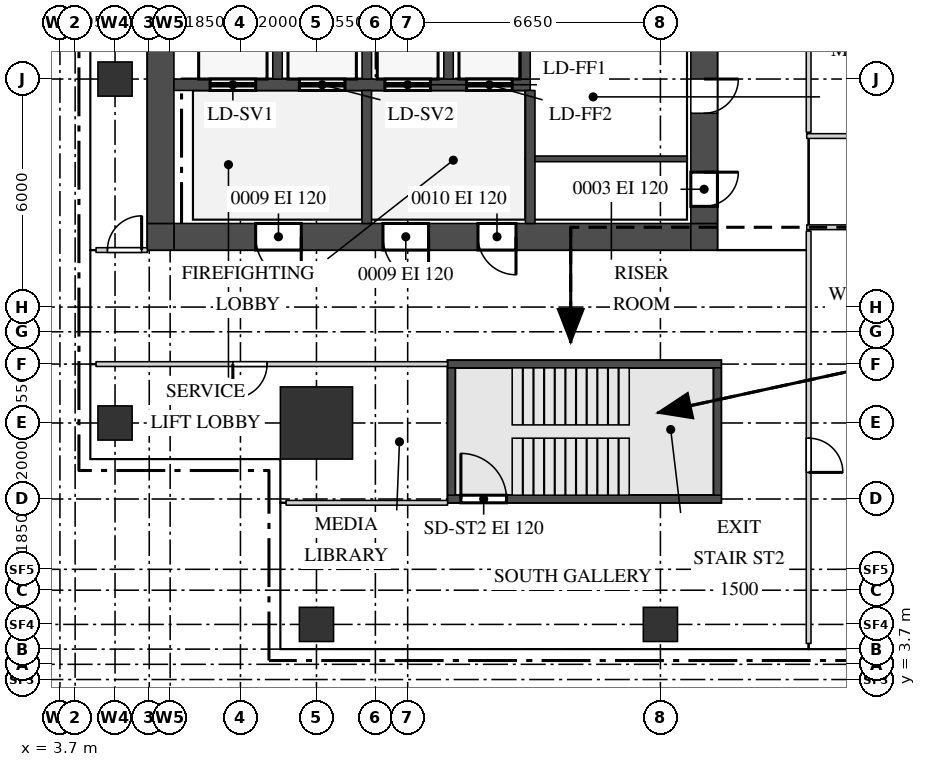
"""IFC4 building model, lengths in metres.
Left out: names, types, materials, properties, quantities, classifications, styles, units other than length and angle.
Written with IfcOpenShell. Run it as: python <this file> out.ifc"""

import sys

from ifc_helpers import new_model, si_unit, direction, frame, frame_2d, origin, origin_2d, place, context, subcontext, project, spatial, rectangle, extrude, source, transform, mapped, element, fill, save


model = new_model("IFC4")
c1 = context("Model", 3, precision=1e-05, world=origin(), true_north=direction((0.0, 1.0)))
c2 = subcontext(c1, "Body", "Model", "MODEL_VIEW")
j1 = project(units=[si_unit("LENGTHUNIT", "METRE"), si_unit("PLANEANGLEUNIT", "RADIAN")], contexts=[c1])
p1 = place(None, origin())
s1 = spatial("IfcSite", under=j1, at=p1, CompositionType="ELEMENT")
p2 = place(p1, origin())
s2 = spatial("IfcBuilding", under=s1, at=p2, CompositionType="ELEMENT")
p3 = place(p2, frame((0.0, 0.0, 246.2)))
s3 = spatial("IfcBuildingStorey", under=s2, at=p3, CompositionType="ELEMENT", Elevation=246.2)
m1 = source(origin(), c2, "Body", "SweptSolid", [
    extrude(rectangle(XDim=13.6, YDim=0.7, at=frame_2d((6.8, 0.0))), origin(), (0.0, 0.0, 1.0), 3.75),
])
p4 = place(p3, frame((6.7, 15.35, 0.0), z_axis=(0.0, 0.0, 1.0), x_axis=(1.0, 0.0, 0.0)))
e1 = element("IfcWall", 1, at=p4, inside=s3, PredefinedType="SHEAR", context=c2, shape_type="MappedRepresentation", body=[
    mapped(m1, transform((0.0, 0.0, 0.0))),
])
m2 = source(origin(), c2, "Body", "SweptSolid", [
    extrude(rectangle(XDim=1.2, YDim=2.1, at=frame_2d((0.6, 1.05))), frame((0.0, 0.36, 0.0), z_axis=(0.0, -1.0, 0.0), x_axis=(1.0, 0.0, 0.0)), (0.0, 0.0, 1.0), 0.72),
])
p5 = place(p4, frame((5.5, 0.0, 0.0)))
e2 = element("IfcOpeningElement", 2, at=p5, cuts=e1, PredefinedType="OPENING", context=c2, shape_type="MappedRepresentation", body=[
    mapped(m2, transform((0.0, 0.0, 0.0))),
])
p6 = place(p4, frame((2.15, 0.0, 0.0)))
e3 = element("IfcOpeningElement", 3, at=p6, cuts=e1, PredefinedType="OPENING", context=c2, shape_type="MappedRepresentation", body=[
    mapped(m2, transform((0.0, 0.0, 0.0))),
])
m3 = source(origin(), c2, "Body", "SweptSolid", [
    extrude(rectangle(XDim=1.0, YDim=2.1, at=frame_2d((0.5, 1.05))), frame((0.0, 0.36, 0.0), z_axis=(0.0, -1.0, 0.0), x_axis=(1.0, 0.0, 0.0)), (0.0, 0.0, 1.0), 0.72),
])
p7 = place(p4, frame((8.0, 0.0, 0.0)))
e4 = element("IfcOpeningElement", 4, at=p7, cuts=e1, PredefinedType="OPENING", context=c2, shape_type="MappedRepresentation", body=[
    mapped(m3, transform((0.0, 0.0, 0.0))),
])
m4 = source(origin(), c2, "Body", "SweptSolid", [
    extrude(rectangle(XDim=0.7, YDim=0.7, at=frame_2d((0.35, 0.0))), origin(), (0.0, 0.0, 1.0), 3.75),
])
for number, where, z_axis, x_axis in (
    (5, (20.3, 15.35, 0.0), (0.0, 0.0, 1.0), (1.0, 0.0, 0.0)),
    (6, (6.0, 15.35, 0.0), (0.0, 0.0, 1.0), (1.0, 0.0, 0.0)),
):
    element("IfcWall", number, at=place(p3, frame(where, z_axis=z_axis, x_axis=x_axis)), inside=s3, PredefinedType="SHEAR", context=c2, shape_type="MappedRepresentation", body=[
        mapped(m4, transform((0.0, 0.0, 0.0))),
    ])
m5 = source(origin(), c2, "Body", "SweptSolid", [
    extrude(rectangle(XDim=22.6, YDim=0.7, at=frame_2d((11.3, 0.0))), origin(), (0.0, 0.0, 1.0), 3.75),
])
p8 = place(p3, frame((20.65, 15.7, 0.0), z_axis=(0.0, 0.0, 1.0), x_axis=(0.0, 1.0, 0.0)))
e7 = element("IfcWall", 7, at=p8, inside=s3, PredefinedType="SHEAR", context=c2, shape_type="MappedRepresentation", body=[
    mapped(m5, transform((0.0, 0.0, 0.0))),
])
m6 = source(origin(), c2, "Body", "SweptSolid", [
    extrude(rectangle(XDim=1.8, YDim=2.1, at=frame_2d((0.9, 1.05))), frame((0.0, 0.36, 0.0), z_axis=(0.0, -1.0, 0.0), x_axis=(1.0, 0.0, 0.0)), (0.0, 0.0, 1.0), 0.72),
])
p9 = place(p8, frame((10.8, 0.0, 0.0)))
e8 = element("IfcOpeningElement", 8, at=p9, cuts=e7, PredefinedType="OPENING", context=c2, shape_type="MappedRepresentation", body=[
    mapped(m6, transform((0.0, 0.0, 0.0))),
])
m7 = source(origin(), c2, "Body", "SweptSolid", [
    extrude(rectangle(XDim=0.9, YDim=2.1, at=frame_2d((0.45, 1.05))), frame((0.0, 0.36, 0.0), z_axis=(0.0, -1.0, 0.0), x_axis=(1.0, 0.0, 0.0)), (0.0, 0.0, 1.0), 0.72),
])
p10 = place(p8, frame((0.45, 0.0, 0.0)))
e9 = element("IfcOpeningElement", 9, at=p10, cuts=e7, PredefinedType="OPENING", context=c2, shape_type="MappedRepresentation", body=[
    mapped(m7, transform((0.0, 0.0, 0.0))),
])
p11 = place(p8, frame((2.9, 0.0, 0.0)))
e10 = element("IfcOpeningElement", 10, at=p11, cuts=e7, PredefinedType="OPENING", context=c2, shape_type="MappedRepresentation", body=[
    mapped(m7, transform((0.0, 0.0, 0.0))),
])
p12 = place(p8, frame((5.65, 0.0, 0.0)))
e11 = element("IfcOpeningElement", 11, at=p12, cuts=e7, PredefinedType="OPENING", context=c2, shape_type="MappedRepresentation", body=[
    mapped(m7, transform((0.0, 0.0, 0.0))),
])
p13 = place(p3, frame((6.35, 15.7, 0.0), z_axis=(0.0, 0.0, 1.0), x_axis=(0.0, 1.0, 0.0)))
e12 = element("IfcWall", 12, at=p13, inside=s3, PredefinedType="SHEAR", context=c2, shape_type="MappedRepresentation", body=[
    mapped(m5, transform((0.0, 0.0, 0.0))),
])
m8 = source(origin(), c2, "Body", "SweptSolid", [
    extrude(rectangle(XDim=7.2, YDim=0.2, at=frame_2d((3.6, 0.0))), origin(), (0.0, 0.0, 1.0), 3.75),
])
p14 = place(p3, frame((13.9, 12.0, 0.0), z_axis=(0.0, 0.0, 1.0), x_axis=(1.0, 0.0, 0.0)))
e13 = element("IfcWall", 13, at=p14, inside=s3, PredefinedType="SHEAR", context=c2, shape_type="MappedRepresentation", body=[
    mapped(m8, transform((0.0, 0.0, 0.0))),
])
p15 = place(p3, frame((13.9, 8.45, 0.0), z_axis=(0.0, 0.0, 1.0), x_axis=(1.0, 0.0, 0.0)))
e14 = element("IfcWall", 14, at=p15, inside=s3, PredefinedType="SHEAR", context=c2, shape_type="MappedRepresentation", body=[
    mapped(m8, transform((0.0, 0.0, 0.0))),
])
m9 = source(origin(), c2, "Body", "SweptSolid", [
    extrude(rectangle(XDim=1.2, YDim=2.1, at=frame_2d((0.6, 1.05))), frame((0.0, 0.11, 0.0), z_axis=(0.0, -1.0, 0.0), x_axis=(1.0, 0.0, 0.0)), (0.0, 0.0, 1.0), 0.22),
])
p16 = place(p15, frame((0.35, 0.0, 0.0)))
e15 = element("IfcOpeningElement", 15, at=p16, cuts=e14, PredefinedType="OPENING", context=c2, shape_type="MappedRepresentation", body=[
    mapped(m9, transform((0.0, 0.0, 0.0))),
])
m10 = source(origin(), c2, "Body", "SweptSolid", [
    extrude(rectangle(XDim=3.35, YDim=0.2, at=frame_2d((1.675, 0.0))), origin(), (0.0, 0.0, 1.0), 3.75),
])
for number, where, z_axis, x_axis in (
    (16, (21.0, 8.55, 0.0), (0.0, 0.0, 1.0), (0.0, 1.0, 0.0)),
    (17, (14.0, 8.55, 0.0), (0.0, 0.0, 1.0), (0.0, 1.0, 0.0)),
):
    element("IfcWall", number, at=place(p3, frame(where, z_axis=z_axis, x_axis=x_axis)), inside=s3, PredefinedType="SHEAR", context=c2, shape_type="MappedRepresentation", body=[
        mapped(m10, transform((0.0, 0.0, 0.0))),
    ])
m11 = source(origin(), c2, "Body", "SweptSolid", [
    extrude(rectangle(XDim=9.375, YDim=0.3, at=frame_2d((4.688, 0.0))), origin(), (0.0, 0.0, 1.0), 3.75),
])
p17 = place(p3, frame((6.7, 19.35, 0.0), z_axis=(0.0, 0.0, 1.0), x_axis=(1.0, 0.0, 0.0)))
e18 = element("IfcWall", 18, at=p17, inside=s3, PredefinedType="STANDARD", context=c2, shape_type="MappedRepresentation", body=[
    mapped(m11, transform((0.0, 0.0, 0.0))),
])
m12 = source(origin(), c2, "Body", "SweptSolid", [
    extrude(rectangle(XDim=1.2, YDim=2.1, at=frame_2d((0.6, 1.05))), frame((0.0, 0.16, 0.0), z_axis=(0.0, -1.0, 0.0), x_axis=(1.0, 0.0, 0.0)), (0.0, 0.0, 1.0), 0.32),
])
p18 = place(p17, frame((0.95, 0.0, 0.0)))
e19 = element("IfcOpeningElement", 19, at=p18, cuts=e18, PredefinedType="OPENING", context=c2, shape_type="MappedRepresentation", body=[
    mapped(m12, transform((0.0, 0.0, 0.0))),
])
p19 = place(p17, frame((3.3, 0.0, 0.0)))
e20 = element("IfcOpeningElement", 20, at=p19, cuts=e18, PredefinedType="OPENING", context=c2, shape_type="MappedRepresentation", body=[
    mapped(m12, transform((0.0, 0.0, 0.0))),
])
p20 = place(p17, frame((5.55, 0.0, 0.0)))
e21 = element("IfcOpeningElement", 21, at=p20, cuts=e18, PredefinedType="OPENING", context=c2, shape_type="MappedRepresentation", body=[
    mapped(m12, transform((0.0, 0.0, 0.0))),
])
p21 = place(p17, frame((7.7, 0.0, 0.0)))
e22 = element("IfcOpeningElement", 22, at=p21, cuts=e18, PredefinedType="OPENING", context=c2, shape_type="MappedRepresentation", body=[
    mapped(m12, transform((0.0, 0.0, 0.0))),
])
m13 = source(origin(), c2, "Body", "SweptSolid", [
    extrude(rectangle(XDim=3.1, YDim=0.25, at=frame_2d((1.55, 0.0))), origin(), (0.0, 0.0, 1.0), 3.75),
])
for number, where, z_axis, x_axis in (
    (23, (9.425, 19.5, 0.0), (0.0, 0.0, 1.0), (0.0, 1.0, 0.0)),
    (24, (11.775, 19.5, 0.0), (0.0, 0.0, 1.0), (0.0, 1.0, 0.0)),
    (25, (13.925, 19.5, 0.0), (0.0, 0.0, 1.0), (0.0, 1.0, 0.0)),
    (26, (15.95, 19.5, 0.0), (0.0, 0.0, 1.0), (0.0, 1.0, 0.0)),
):
    element("IfcWall", number, at=place(p3, frame(where, z_axis=z_axis, x_axis=x_axis)), inside=s3, PredefinedType="STANDARD", context=c2, shape_type="MappedRepresentation", body=[
        mapped(m13, transform((0.0, 0.0, 0.0))),
    ])
m14 = source(origin(), c2, "Body", "SweptSolid", [
    extrude(rectangle(XDim=3.5, YDim=0.25, at=frame_2d((1.75, 0.0))), origin(), (0.0, 0.0, 1.0), 3.75),
])
for number, where, z_axis, x_axis in (
    (27, (16.075, 15.7, 0.0), (0.0, 0.0, 1.0), (0.0, 1.0, 0.0)),
    (28, (11.775, 15.7, 0.0), (0.0, 0.0, 1.0), (0.0, 1.0, 0.0)),
):
    element("IfcWall", number, at=place(p3, frame(where, z_axis=z_axis, x_axis=x_axis)), inside=s3, PredefinedType="STANDARD", context=c2, shape_type="MappedRepresentation", body=[
        mapped(m14, transform((0.0, 0.0, 0.0))),
    ])
m15 = source(origin(), c2, "Body", "SweptSolid", [
    extrude(rectangle(XDim=1.9, YDim=1.9, at=origin_2d()), origin(), (0.0, 0.0, 1.0), 4.0),
])
p22 = place(p3, frame((10.45, 10.45, 0.0), z_axis=(0.0, 0.0, 1.0), x_axis=(1.0, 0.0, 0.0)))
e29 = element("IfcColumn", 29, at=p22, inside=s3, PredefinedType="COLUMN", context=c2, shape_type="MappedRepresentation", body=[
    mapped(m15, transform((0.0, 0.0, 0.0))),
])
m16 = source(origin(), c2, "Body", "SweptSolid", [
    extrude(rectangle(XDim=0.9, YDim=0.9, at=origin_2d()), origin(), (0.0, 0.0, 1.0), 3.75),
])
for number, where, z_axis, x_axis in (
    (30, (10.45, 5.15, 0.0), (0.0, 0.0, 1.0), (1.0, 0.0, 0.0)),
    (31, (19.5, 5.15, 0.0), (0.0, 0.0, 1.0), (1.0, 0.0, 0.0)),
    (32, (5.15, 10.45, 0.0), (0.0, 0.0, 1.0), (1.0, 0.0, 0.0)),
    (33, (5.15, 19.5, 0.0), (0.0, 0.0, 1.0), (1.0, 0.0, 0.0)),
):
    element("IfcColumn", number, at=place(p3, frame(where, z_axis=z_axis, x_axis=x_axis)), inside=s3, PredefinedType="COLUMN", context=c2, shape_type="MappedRepresentation", body=[
        mapped(m16, transform((0.0, 0.0, 0.0))),
    ])
m17 = source(origin(), c2, "Body", "SweptSolid", [
    extrude(rectangle(XDim=10.85, YDim=0.125, at=frame_2d((5.425, 0.0))), origin(), (0.0, 0.0, 1.0), 3.8),
])
p23 = place(p3, frame((23.4, 4.65, 0.0), z_axis=(0.0, 0.0, 1.0), x_axis=(0.0, 1.0, 0.0)))
e34 = element("IfcWall", 34, at=p23, inside=s3, PredefinedType="PARTITIONING", context=c2, shape_type="MappedRepresentation", body=[
    mapped(m17, transform((0.0, 0.0, 0.0))),
])
m18 = source(origin(), c2, "Body", "SweptSolid", [
    extrude(rectangle(XDim=0.9, YDim=2.1, at=frame_2d((0.45, 1.05))), frame((0.0, 0.073, 0.0), z_axis=(0.0, -1.0, 0.0), x_axis=(1.0, 0.0, 0.0)), (0.0, 0.0, 1.0), 0.145),
])
p24 = place(p23, frame((4.5, 0.0, 0.0)))
e35 = element("IfcOpeningElement", 35, at=p24, cuts=e34, PredefinedType="OPENING", context=c2, shape_type="MappedRepresentation", body=[
    mapped(m18, transform((0.0, 0.0, 0.0))),
])
m19 = source(origin(), c2, "Body", "SweptSolid", [
    extrude(rectangle(XDim=4.25, YDim=0.125, at=frame_2d((2.125, 0.0))), origin(), (0.0, 0.0, 1.0), 3.8),
])
p25 = place(p3, frame((9.65, 8.35, 0.0), z_axis=(0.0, 0.0, 1.0), x_axis=(1.0, 0.0, 0.0)))
e36 = element("IfcWall", 36, at=p25, inside=s3, PredefinedType="PARTITIONING", context=c2, shape_type="MappedRepresentation", body=[
    mapped(m19, transform((0.0, 0.0, 0.0))),
])
m20 = source(origin(), c2, "Body", "SweptSolid", [
    extrude(rectangle(XDim=9.25, YDim=0.125, at=frame_2d((4.625, 0.0))), origin(), (0.0, 0.0, 1.0), 3.8),
])
p26 = place(p3, frame((4.65, 12.0, 0.0), z_axis=(0.0, 0.0, 1.0), x_axis=(1.0, 0.0, 0.0)))
e37 = element("IfcWall", 37, at=p26, inside=s3, PredefinedType="PARTITIONING", context=c2, shape_type="MappedRepresentation", body=[
    mapped(m20, transform((0.0, 0.0, 0.0))),
])
p27 = place(p26, frame((3.6, 0.0, 0.0)))
e38 = element("IfcOpeningElement", 38, at=p27, cuts=e37, PredefinedType="OPENING", context=c2, shape_type="MappedRepresentation", body=[
    mapped(m18, transform((0.0, 0.0, 0.0))),
])
m21 = source(origin(), c2, "Body", "SweptSolid", [
    extrude(rectangle(XDim=1.35, YDim=0.125, at=frame_2d((0.675, 0.0))), origin(), (0.0, 0.0, 1.0), 3.8),
])
p28 = place(p3, frame((4.65, 15.0, 0.0), z_axis=(0.0, 0.0, 1.0), x_axis=(1.0, 0.0, 0.0)))
e39 = element("IfcWall", 39, at=p28, inside=s3, PredefinedType="PARTITIONING", context=c2, shape_type="MappedRepresentation", body=[
    mapped(m21, transform((0.0, 0.0, 0.0))),
])
p29 = place(p28, frame((0.3, 0.0, 0.0)))
e40 = element("IfcOpeningElement", 40, at=p29, cuts=e39, PredefinedType="OPENING", context=c2, shape_type="MappedRepresentation", body=[
    mapped(m18, transform((0.0, 0.0, 0.0))),
])
m22 = source(origin(), c2, "Body", "SweptSolid", [
    extrude(rectangle(XDim=26.0, YDim=0.125, at=frame_2d((13.0, 0.0))), origin(), (0.0, 0.0, 1.0), 3.8),
])
p30 = place(p3, frame((23.35, 15.6, 0.0), z_axis=(0.0, 0.0, 1.0), x_axis=(1.0, 0.0, 0.0)))
e41 = element("IfcWall", 41, at=p30, inside=s3, PredefinedType="PARTITIONING", context=c2, shape_type="MappedRepresentation", body=[
    mapped(m22, transform((0.0, 0.0, 0.0))),
])
p31 = place(p30, frame((4.05, 0.0, 0.0)))
e42 = element("IfcOpeningElement", 42, at=p31, cuts=e41, PredefinedType="OPENING", context=c2, shape_type="MappedRepresentation", body=[
    mapped(m18, transform((0.0, 0.0, 0.0))),
])
m23 = source(origin(), c2, "Body", "SweptSolid", [
    extrude(rectangle(XDim=1.0, YDim=2.1, at=frame_2d((0.5, 1.05))), frame((0.0, 0.073, 0.0), z_axis=(0.0, -1.0, 0.0), x_axis=(1.0, 0.0, 0.0)), (0.0, 0.0, 1.0), 0.145),
])
p32 = place(p30, frame((6.85, 0.0, 0.0)))
e43 = element("IfcOpeningElement", 43, at=p32, cuts=e41, PredefinedType="OPENING", context=c2, shape_type="MappedRepresentation", body=[
    mapped(m23, transform((0.0, 0.0, 0.0))),
])
p33 = place(p30, frame((9.25, 0.0, 0.0)))
e44 = element("IfcOpeningElement", 44, at=p33, cuts=e41, PredefinedType="OPENING", context=c2, shape_type="MappedRepresentation", body=[
    mapped(m18, transform((0.0, 0.0, 0.0))),
])
m24 = source(origin(), c2, "Body", "SweptSolid", [
    extrude(rectangle(XDim=1.2, YDim=2.1, at=frame_2d((0.6, 1.05))), frame((0.0, 0.073, 0.0), z_axis=(0.0, -1.0, 0.0), x_axis=(1.0, 0.0, 0.0)), (0.0, 0.0, 1.0), 0.145),
])
p34 = place(p30, frame((18.05, 0.0, 0.0)))
e45 = element("IfcOpeningElement", 45, at=p34, cuts=e41, PredefinedType="OPENING", context=c2, shape_type="MappedRepresentation", body=[
    mapped(m24, transform((0.0, 0.0, 0.0))),
])
m25 = source(origin(), c2, "Body", "SweptSolid", [
    extrude(rectangle(XDim=4.0, YDim=0.15, at=frame_2d((2.0, 0.0))), origin(), (0.0, 0.0, 1.0), 3.8),
])
p35 = place(p3, frame((16.2, 17.4, 0.0), z_axis=(0.0, 0.0, 1.0), x_axis=(1.0, 0.0, 0.0)))
e46 = element("IfcWall", 46, at=p35, inside=s3, PredefinedType="PARTITIONING", context=c2, shape_type="MappedRepresentation", body=[
    mapped(m25, transform((0.0, 0.0, 0.0))),
])
p36 = place(p3, frame((23.35, 18.0, 0.0), z_axis=(0.0, 0.0, 1.0), x_axis=(1.0, 0.0, 0.0)))
e47 = element("IfcWall", 47, at=p36, inside=s3, PredefinedType="PARTITIONING", context=c2, shape_type="MappedRepresentation", body=[
    mapped(m22, transform((0.0, 0.0, 0.0))),
])
p37 = place(p36, frame((12.5, 0.0, 0.0)))
e48 = element("IfcOpeningElement", 48, at=p37, cuts=e47, PredefinedType="OPENING", context=c2, shape_type="MappedRepresentation", body=[
    mapped(m24, transform((0.0, 0.0, 0.0))),
])
m26 = source(origin(), c2, "Body", "SweptSolid", [
    extrude(rectangle(XDim=20.8, YDim=0.125, at=frame_2d((10.4, 0.0))), origin(), (0.0, 0.0, 1.0), 3.8),
])
p38 = place(p3, frame((23.4, 18.1, 0.0), z_axis=(0.0, 0.0, 1.0), x_axis=(0.0, 1.0, 0.0)))
e49 = element("IfcWall", 49, at=p38, inside=s3, PredefinedType="PARTITIONING", context=c2, shape_type="MappedRepresentation", body=[
    mapped(m26, transform((0.0, 0.0, 0.0))),
])
p39 = place(p38, frame((12.05, 0.0, 0.0)))
e50 = element("IfcOpeningElement", 50, at=p39, cuts=e49, PredefinedType="OPENING", context=c2, shape_type="MappedRepresentation", body=[
    mapped(m24, transform((0.0, 0.0, 0.0))),
])
m27 = source(origin(), c2, "Body", "SweptSolid", [
    extrude(rectangle(XDim=0.9, YDim=2.1, at=frame_2d((0.45, 1.05))), frame((0.0, 0.3, 0.0), z_axis=(0.0, -1.0, 0.0), x_axis=(1.0, 0.0, 0.0)), (0.0, 0.0, 1.0), 0.6),
])
p40 = place(p10, origin())
e51 = element("IfcDoor", 51, at=p40, inside=s3, OperationType="SINGLE_SWING_RIGHT", PredefinedType="DOOR", context=c2, shape_type="MappedRepresentation", body=[
    mapped(m27, transform((0.0, 0.0, 0.0))),
])
fill(e9, e51)
p41 = place(p11, origin())
e52 = element("IfcDoor", 52, at=p41, inside=s3, OperationType="SINGLE_SWING_RIGHT", PredefinedType="DOOR", context=c2, shape_type="MappedRepresentation", body=[
    mapped(m27, transform((0.0, 0.0, 0.0))),
])
fill(e10, e52)
m28 = source(origin(), c2, "Body", "SweptSolid", [
    extrude(rectangle(XDim=1.2, YDim=2.1, at=frame_2d((0.6, 1.05))), frame((0.0, 0.3, 0.0), z_axis=(0.0, -1.0, 0.0), x_axis=(1.0, 0.0, 0.0)), (0.0, 0.0, 1.0), 0.6),
])
p42 = place(p5, origin())
e53 = element("IfcDoor", 53, at=p42, inside=s3, OperationType="SINGLE_SWING_RIGHT", PredefinedType="DOOR", context=c2, shape_type="MappedRepresentation", body=[
    mapped(m28, transform((0.0, 0.0, 0.0))),
])
fill(e2, e53)
p43 = place(p6, origin())
e54 = element("IfcDoor", 54, at=p43, inside=s3, OperationType="SINGLE_SWING_RIGHT", PredefinedType="DOOR", context=c2, shape_type="MappedRepresentation", body=[
    mapped(m28, transform((0.0, 0.0, 0.0))),
])
fill(e3, e54)
m29 = source(origin(), c2, "Body", "SweptSolid", [
    extrude(rectangle(XDim=1.0, YDim=2.1, at=frame_2d((0.5, 1.05))), frame((0.0, 0.3, 0.0), z_axis=(0.0, -1.0, 0.0), x_axis=(1.0, 0.0, 0.0)), (0.0, 0.0, 1.0), 0.6),
])
p44 = place(p7, origin())
e55 = element("IfcDoor", 55, at=p44, inside=s3, OperationType="SINGLE_SWING_RIGHT", PredefinedType="DOOR", context=c2, shape_type="MappedRepresentation", body=[
    mapped(m29, transform((0.0, 0.0, 0.0))),
])
fill(e4, e55)
m30 = source(origin(), c2, "Body", "SweptSolid", [
    extrude(rectangle(XDim=0.9, YDim=2.1, at=frame_2d((0.45, 1.05))), frame((0.0, 0.025, 0.0), z_axis=(0.0, -1.0, 0.0), x_axis=(1.0, 0.0, 0.0)), (0.0, 0.0, 1.0), 0.05),
])
p45 = place(p29, origin())
e56 = element("IfcDoor", 56, at=p45, inside=s3, OperationType="SINGLE_SWING_LEFT", PredefinedType="DOOR", context=c2, shape_type="MappedRepresentation", body=[
    mapped(m30, transform((0.0, 0.0, 0.0))),
])
fill(e40, e56)
p46 = place(p27, origin())
e57 = element("IfcDoor", 57, at=p46, inside=s3, OperationType="SINGLE_SWING_LEFT", PredefinedType="DOOR", context=c2, shape_type="MappedRepresentation", body=[
    mapped(m30, transform((0.0, 0.0, 0.0))),
])
fill(e38, e57)
p47 = place(p24, origin())
e58 = element("IfcDoor", 58, at=p47, inside=s3, OperationType="SINGLE_SWING_LEFT", PredefinedType="DOOR", context=c2, shape_type="MappedRepresentation", body=[
    mapped(m30, transform((0.0, 0.0, 0.0))),
])
fill(e35, e58)
m31 = source(origin(), c2, "Body", "SweptSolid", [
    extrude(rectangle(XDim=1.2, YDim=2.1, at=frame_2d((0.6, 1.05))), frame((0.0, 0.025, 0.0), z_axis=(0.0, -1.0, 0.0), x_axis=(1.0, 0.0, 0.0)), (0.0, 0.0, 1.0), 0.05),
])
p48 = place(p16, origin())
e59 = element("IfcDoor", 59, at=p48, inside=s3, OperationType="SINGLE_SWING_RIGHT", PredefinedType="DOOR", context=c2, shape_type="MappedRepresentation", body=[
    mapped(m31, transform((0.0, 0.0, 0.0))),
])
fill(e15, e59)
p49 = place(p18, origin())
e60 = element("IfcDoor", 60, at=p49, inside=s3, OperationType="DOUBLE_DOOR_SLIDING", PredefinedType="DOOR", context=c2, shape_type="MappedRepresentation", body=[
    mapped(m31, transform((0.0, 0.0, 0.0))),
])
fill(e19, e60)
p50 = place(p19, origin())
e61 = element("IfcDoor", 61, at=p50, inside=s3, OperationType="DOUBLE_DOOR_SLIDING", PredefinedType="DOOR", context=c2, shape_type="MappedRepresentation", body=[
    mapped(m31, transform((0.0, 0.0, 0.0))),
])
fill(e20, e61)
p51 = place(p20, origin())
e62 = element("IfcDoor", 62, at=p51, inside=s3, OperationType="DOUBLE_DOOR_SLIDING", PredefinedType="DOOR", context=c2, shape_type="MappedRepresentation", body=[
    mapped(m31, transform((0.0, 0.0, 0.0))),
])
fill(e21, e62)
p52 = place(p21, origin())
e63 = element("IfcDoor", 63, at=p52, inside=s3, OperationType="DOUBLE_DOOR_SLIDING", PredefinedType="DOOR", context=c2, shape_type="MappedRepresentation", body=[
    mapped(m31, transform((0.0, 0.0, 0.0))),
])
fill(e22, e63)
save(model, sys.argv[1])
